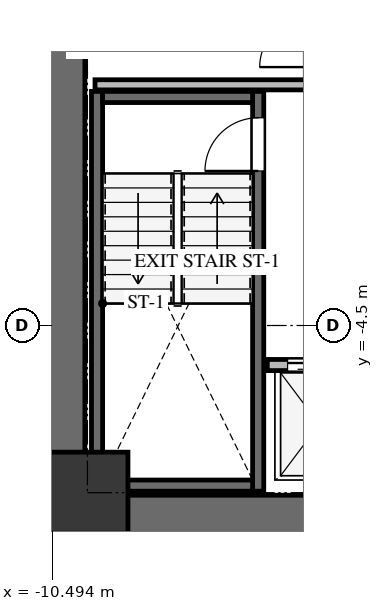
"""IFC4 building model, lengths in metres.
Left out: names, types, materials, properties, quantities, classifications, styles, units other than length and angle.
Written with IfcOpenShell. Run it as: python <this file> out.ifc"""

import sys

from ifc_helpers import new_model, si_unit, direction, frame, frame_2d, origin, origin_2d, place, context, subcontext, project, spatial, rectangle, extrude, source, transform, mapped, element, fill, save


model = new_model("IFC4")
c1 = context("Model", 3, precision=1e-05, world=origin(), true_north=direction((0.0, 1.0)))
c2 = subcontext(c1, "Body", "Model", "MODEL_VIEW")
j1 = project(units=[si_unit("LENGTHUNIT", "METRE"), si_unit("PLANEANGLEUNIT", "RADIAN")], contexts=[c1])
p1 = place(None, origin())
s1 = spatial("IfcSite", under=j1, at=p1, CompositionType="ELEMENT")
p2 = place(p1, origin())
s2 = spatial("IfcBuilding", under=s1, at=p2, CompositionType="ELEMENT")
p3 = place(p2, frame((0.0, 0.0, 72.0)))
s3 = spatial("IfcBuildingStorey", under=s2, at=p3, CompositionType="ELEMENT", Elevation=72.0)
p4 = place(p3, frame((-10.3, -8.75, 0.0), z_axis=(0.0, 0.0, 1.0), x_axis=(0.0, 1.0, 0.0)))
e1 = element("IfcWall", 1, at=p4, inside=s3, PredefinedType="SHEAR", context=c2, shape_type="SweptSolid", body=[
    extrude(rectangle(XDim=17.5, YDim=0.9, at=frame_2d((8.75, 0.0))), origin(), (0.0, 0.0, 1.0), 3.3),
])
p5 = place(p3, frame((-9.85, -8.3, 0.0), z_axis=(0.0, 0.0, 1.0), x_axis=(1.0, 0.0, 0.0)))
e2 = element("IfcWall", 2, at=p5, inside=s3, PredefinedType="SHEAR", context=c2, shape_type="SweptSolid", body=[
    extrude(rectangle(XDim=7.75, YDim=0.9, at=frame_2d((3.875, 0.0))), origin(), (0.0, 0.0, 1.0), 3.3),
])
p6 = place(p3, frame((-6.43, -7.77, -0.24), z_axis=(0.0, 0.0, 1.0), x_axis=(0.0, 1.0, 0.0)))
e3 = element("IfcWall", 3, at=p6, inside=s3, PredefinedType="SHEAR", context=c2, shape_type="SweptSolid", body=[
    extrude(rectangle(XDim=7.89, YDim=0.22, at=frame_2d((3.945, 0.0))), origin(), (0.0, 0.0, 1.0), 3.3),
])
p7 = place(p6, frame((6.32, 0.0, 0.0)))
e4 = element("IfcOpeningElement", 4, at=p7, cuts=e3, PredefinedType="OPENING", context=c2, shape_type="SweptSolid", body=[
    extrude(rectangle(XDim=1.05, YDim=2.15, at=frame_2d((0.525, 1.075))), frame((0.0, 0.12, 0.0), z_axis=(0.0, -1.0, 0.0), x_axis=(1.0, 0.0, 0.0)), (0.0, 0.0, 1.0), 0.24),
])
p8 = place(p3, frame((-9.61, 0.12, -0.24), z_axis=(0.0, 0.0, 1.0), x_axis=(0.0, -1.0, 0.0)))
e5 = element("IfcWall", 5, at=p8, inside=s3, PredefinedType="SHEAR", context=c2, shape_type="SweptSolid", body=[
    extrude(rectangle(XDim=7.89, YDim=0.22, at=frame_2d((3.945, 0.0))), origin(), (0.0, 0.0, 1.0), 3.3),
])
for number, where, z_axis, x_axis in (
    (6, (-9.5, -7.66, -0.24), (0.0, 0.0, 1.0), (1.0, 0.0, 0.0)),
    (7, (-6.54, 0.01, -0.24), (0.0, 0.0, 1.0), (-1.0, 0.0, 0.0)),
):
    element("IfcWall", number, at=place(p3, frame(where, z_axis=z_axis, x_axis=x_axis)), inside=s3, PredefinedType="SHEAR", context=c2, shape_type="SweptSolid", body=[
        extrude(rectangle(XDim=2.96, YDim=0.22, at=frame_2d((1.48, 0.0))), origin(), (0.0, 0.0, 1.0), 3.3),
    ])
m1 = source(origin(), c2, "Body", "SweptSolid", [
    extrude(rectangle(XDim=1.6, YDim=1.6, at=origin_2d()), origin(), (0.0, 0.0, 1.0), 3.3),
])
p9 = place(p3, frame((-9.8, -7.8, -0.24), z_axis=(0.0, 0.0, 1.0), x_axis=(1.0, 0.0, 0.0)))
e8 = element("IfcColumn", 8, at=p9, inside=s3, PredefinedType="COLUMN", context=c2, shape_type="MappedRepresentation", body=[
    mapped(m1, transform((0.0, 0.0, 0.0), x_axis=(1.0, 0.0, 0.0), y_axis=(0.0, 1.0, 0.0), z_axis=(0.0, 0.0, 1.0), scale=1.0)),
])
p10 = place(p3, frame((-9.65, 0.25, 0.0), z_axis=(0.0, 0.0, 1.0), x_axis=(1.0, 0.0, 0.0)))
e9 = element("IfcWall", 9, at=p10, inside=s3, PredefinedType="SOLIDWALL", context=c2, shape_type="SweptSolid", body=[
    extrude(rectangle(XDim=4.27, YDim=0.2, at=frame_2d((2.135, 0.0))), origin(), (0.0, 0.0, 1.0), 3.045),
])
p11 = place(p3, frame((-6.25, -5.28, 0.0), z_axis=(0.0, 0.0, 1.0), x_axis=(1.0, 0.0, 0.0)))
e10 = element("IfcWall", 10, at=p11, inside=s3, PredefinedType="SOLIDWALL", context=c2, shape_type="SweptSolid", body=[
    extrude(rectangle(XDim=3.9, YDim=0.22, at=frame_2d((1.95, 0.0))), origin(), (0.0, 0.0, 1.0), 3.045),
])
p12 = place(p11, frame((0.4, 0.0, 0.0)))
e11 = element("IfcOpeningElement", 11, at=p12, cuts=e10, PredefinedType="OPENING", context=c2, shape_type="SweptSolid", body=[
    extrude(rectangle(XDim=1.1, YDim=2.15, at=frame_2d((0.55, 1.075))), frame((0.0, 0.12, 0.0), z_axis=(0.0, -1.0, 0.0), x_axis=(1.0, 0.0, 0.0)), (0.0, 0.0, 1.0), 0.24),
])
p13 = place(p11, frame((2.25, 0.0, 0.0)))
e12 = element("IfcOpeningElement", 12, at=p13, cuts=e10, PredefinedType="OPENING", context=c2, shape_type="SweptSolid", body=[
    extrude(rectangle(XDim=1.1, YDim=2.15, at=frame_2d((0.55, 1.075))), frame((0.0, 0.12, 0.0), z_axis=(0.0, -1.0, 0.0), x_axis=(1.0, 0.0, 0.0)), (0.0, 0.0, 1.0), 0.24),
])
m2 = source(origin(), c2, "Body", "SweptSolid", [
    extrude(rectangle(XDim=1.05, YDim=2.15, at=frame_2d((0.525, 1.075))), frame((0.0, 0.025, 0.0), z_axis=(0.0, -1.0, 0.0), x_axis=(1.0, 0.0, 0.0)), (0.0, 0.0, 1.0), 0.05),
])
p14 = place(p7, origin())
e13 = element("IfcDoor", 13, at=p14, inside=s3, OperationType="SINGLE_SWING_LEFT", PredefinedType="DOOR", context=c2, shape_type="MappedRepresentation", body=[
    mapped(m2, transform((0.0, 0.0, 0.0), x_axis=(1.0, 0.0, 0.0), y_axis=(0.0, 1.0, 0.0), z_axis=(0.0, 0.0, 1.0), scale=1.0)),
])
fill(e4, e13)
m3 = source(origin(), c2, "Body", "SweptSolid", [
    extrude(rectangle(XDim=1.1, YDim=2.15, at=frame_2d((0.55, 1.075))), frame((0.0, 0.025, 0.0), z_axis=(0.0, -1.0, 0.0), x_axis=(1.0, 0.0, 0.0)), (0.0, 0.0, 1.0), 0.05),
])
p15 = place(p12, origin())
e14 = element("IfcDoor", 14, at=p15, inside=s3, OperationType="DOUBLE_DOOR_SLIDING", PredefinedType="DOOR", context=c2, shape_type="MappedRepresentation", body=[
    mapped(m3, transform((0.0, 0.0, 0.0), x_axis=(1.0, 0.0, 0.0), y_axis=(0.0, 1.0, 0.0), z_axis=(0.0, 0.0, 1.0), scale=1.0)),
])
fill(e11, e14)
save(model, sys.argv[1])
